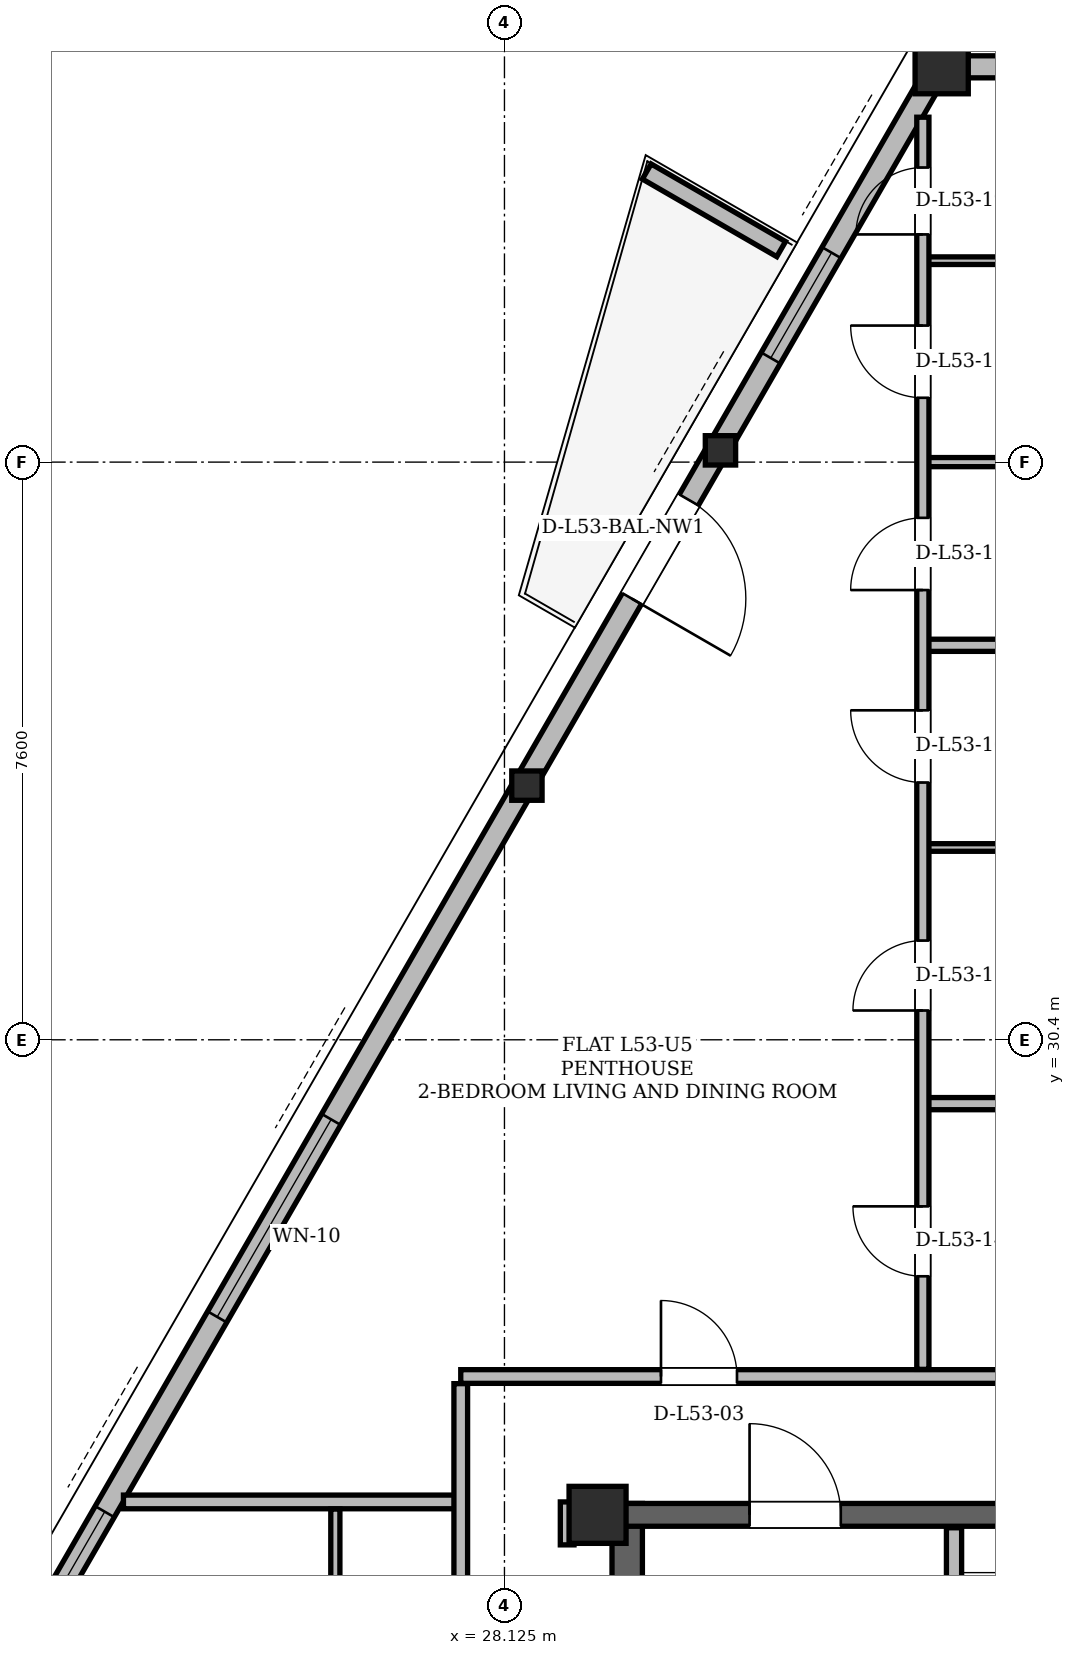
"""IFC4 building model, lengths in metres.
Left out: names, types, materials, properties, quantities, classifications, styles, units other than length and angle.
Written with IfcOpenShell. Run it as: python <this file> out.ifc"""

import sys

from ifc_helpers import new_model, si_unit, direction, frame, frame_2d, origin, origin_2d, place, context, subcontext, project, spatial, polyline, rectangle, hollow_rectangle, i_section, outline, extrude, element, fill, save


model = new_model("IFC4")
c1 = context("Model", 3, precision=1e-05, world=origin(), true_north=direction((0.0, 1.0)))
c2 = subcontext(c1, "Body", "Model", "MODEL_VIEW")
j1 = project(units=[si_unit("LENGTHUNIT", "METRE"), si_unit("PLANEANGLEUNIT", "RADIAN")], contexts=[c1])
p1 = place(None, origin())
s1 = spatial("IfcSite", under=j1, at=p1, CompositionType="ELEMENT")
p2 = place(p1, origin())
s2 = spatial("IfcBuilding", under=s1, at=p2, CompositionType="ELEMENT")
p3 = place(p2, frame((0.0, 0.0, 201.0)))
s3 = spatial("IfcBuildingStorey", under=s2, at=p3, CompositionType="ELEMENT", Elevation=201.0)
p4 = place(p3, frame((29.35, 24.15, 0.0), z_axis=(0.0, 0.0, 1.0), x_axis=(1.0, 0.0, 0.0)))
e1 = element("IfcColumn", 1, at=p4, inside=s3, PredefinedType="COLUMN", context=c2, shape_type="SweptSolid", body=[
    extrude(hollow_rectangle(XDim=0.75, YDim=0.75, WallThickness=0.06, at=origin_2d()), origin(), (0.0, 0.0, 1.0), 3.6),
])
p5 = place(p3, frame((33.841, 43.2, 0.004), z_axis=(0.020527252643, -0.002582899339, 0.999785957358), x_axis=(0.124843395554, 0.9921764594, 0.0)))
e2 = element("IfcColumn", 2, at=p5, inside=s3, PredefinedType="COLUMN", context=c2, shape_type="SweptSolid", body=[
    extrude(hollow_rectangle(XDim=0.7, YDim=0.7, WallThickness=0.055, at=origin_2d()), origin(), (0.0, 0.0, 1.0), 3.592),
])
for number, where, z_axis, x_axis in (
    (3, (30.933, 38.163, 0.004), (0.019, -0.005, 1.0), (0.243, 0.97, 0.0)),
    (4, (28.388, 33.756, 0.004), (0.018, -0.007, 1.0), (0.351, 0.936, 0.0)),
):
    element("IfcColumn", number, at=place(p3, frame(where, z_axis=z_axis, x_axis=x_axis)), inside=s3, PredefinedType="COLUMN", context=c2, shape_type="SweptSolid", body=[
        extrude(i_section(OverallWidth=0.399, OverallDepth=0.386, WebThickness=0.021, FlangeThickness=0.033, at=origin_2d()), origin(), (0.0, 0.0, 1.0), 3.592),
    ])
p6 = place(p3, frame((29.74, 11.0, 0.0), z_axis=(0.0, 0.0, 1.0), x_axis=(0.0, 1.0, 0.0)))
e5 = element("IfcWall", 5, at=p6, inside=s3, PredefinedType="SHEAR", context=c2, shape_type="SweptSolid", body=[
    extrude(rectangle(XDim=13.3, YDim=0.4, at=frame_2d((6.65, 0.0))), origin(), (0.0, 0.0, 1.0), 3.38),
])
p7 = place(p3, frame((29.65, 24.15, 0.0), z_axis=(0.0, 0.0, 1.0), x_axis=(1.0, 0.0, 0.0)))
e6 = element("IfcWall", 6, at=p7, inside=s3, PredefinedType="SHEAR", context=c2, shape_type="SweptSolid", body=[
    extrude(rectangle(XDim=15.7, YDim=0.3, at=frame_2d((7.85, 0.0))), origin(), (0.0, 0.0, 1.0), 3.38),
])
p8 = place(p7, frame((1.7, 0.0, 0.0)))
e7 = element("IfcOpeningElement", 7, at=p8, cuts=e6, PredefinedType="OPENING", context=c2, shape_type="SweptSolid", body=[
    extrude(rectangle(XDim=1.2, YDim=2.2, at=frame_2d((0.6, 1.1))), frame((0.0, 0.15, 0.0), z_axis=(0.0, -1.0, 0.0), x_axis=(1.0, 0.0, 0.0)), (0.0, 0.0, 1.0), 0.3),
])
p9 = place(p7, frame((12.8, 0.0, 0.0)))
e8 = element("IfcOpeningElement", 8, at=p9, cuts=e6, PredefinedType="OPENING", context=c2, shape_type="SweptSolid", body=[
    extrude(rectangle(XDim=1.2, YDim=2.2, at=frame_2d((0.6, 1.1))), frame((0.0, 0.15, 0.0), z_axis=(0.0, -1.0, 0.0), x_axis=(1.0, 0.0, 0.0)), (0.0, 0.0, 1.0), 0.3),
])
p10 = place(p7, frame((6.55, 0.0, 0.0)))
e9 = element("IfcOpeningElement", 9, at=p10, cuts=e6, PredefinedType="OPENING", context=c2, shape_type="SweptSolid", body=[
    extrude(rectangle(XDim=0.9, YDim=2.05, at=frame_2d((0.45, 1.025))), frame((0.0, 0.15, 0.0), z_axis=(0.0, -1.0, 0.0), x_axis=(1.0, 0.0, 0.0)), (0.0, 0.0, 1.0), 0.3),
])
p11 = place(p7, frame((8.45, 0.0, 0.0)))
e10 = element("IfcOpeningElement", 10, at=p11, cuts=e6, PredefinedType="OPENING", context=c2, shape_type="SweptSolid", body=[
    extrude(rectangle(XDim=0.9, YDim=2.05, at=frame_2d((0.45, 1.025))), frame((0.0, 0.15, 0.0), z_axis=(0.0, -1.0, 0.0), x_axis=(1.0, 0.0, 0.0)), (0.0, 0.0, 1.0), 0.3),
])
p12 = place(p3, frame((41.159, 43.2, 0.0), z_axis=(0.0, 0.0, 1.0), x_axis=(-1.0, 0.0, 0.0)))
e11 = element("IfcWall", 11, at=p12, inside=s3, PredefinedType="SOLIDWALL", context=c2, shape_type="SweptSolid", body=[
    extrude(rectangle(XDim=7.318, YDim=0.29, at=frame_2d((3.659, 0.0))), origin(), (0.0, 0.0, 1.0), 2.677),
])
p13 = place(p3, frame((33.841, 43.2, 0.0), z_axis=(0.0, 0.0, 1.0), x_axis=(-0.500001310321, -0.866024647269, 0.0)))
e12 = element("IfcWall", 12, at=p13, inside=s3, PredefinedType="SOLIDWALL", context=c2, shape_type="SweptSolid", body=[
    extrude(rectangle(XDim=36.352, YDim=0.29, at=frame_2d((18.176, 0.0))), origin(), (0.0, 0.0, 1.0), 2.677),
])
p14 = place(p13, frame((6.579, 0.0, 0.0)))
e13 = element("IfcOpeningElement", 13, at=p14, cuts=e12, PredefinedType="OPENING", context=c2, shape_type="SweptSolid", body=[
    extrude(rectangle(XDim=1.5, YDim=2.2, at=frame_2d((0.75, 1.1))), frame((0.0, 0.145, 0.0), z_axis=(0.0, -1.0, 0.0), x_axis=(1.0, 0.0, 0.0)), (0.0, 0.0, 1.0), 0.29),
])
p15 = place(p13, frame((26.818, 0.0, 0.0)))
e14 = element("IfcOpeningElement", 14, at=p15, cuts=e12, PredefinedType="OPENING", context=c2, shape_type="SweptSolid", body=[
    extrude(rectangle(XDim=1.5, YDim=2.2, at=frame_2d((0.75, 1.1))), frame((0.0, 0.145, 0.0), z_axis=(0.0, -1.0, 0.0), x_axis=(1.0, 0.0, 0.0)), (0.0, 0.0, 1.0), 0.29),
])
p16 = place(p13, frame((32.924, 0.0, 0.85)))
e15 = element("IfcOpeningElement", 15, at=p16, cuts=e12, PredefinedType="OPENING", context=c2, shape_type="SweptSolid", body=[
    extrude(rectangle(XDim=1.2, YDim=1.48, at=frame_2d((0.6, 0.74))), frame((0.0, 0.145, 0.0), z_axis=(0.0, -1.0, 0.0), x_axis=(1.0, 0.0, 0.0)), (0.0, 0.0, 1.0), 0.29),
])
p17 = place(p13, frame((21.949, 0.0, 0.85)))
e16 = element("IfcOpeningElement", 16, at=p17, cuts=e12, PredefinedType="OPENING", context=c2, shape_type="SweptSolid", body=[
    extrude(rectangle(XDim=2.0, YDim=1.717, at=frame_2d((1.0, 0.858))), frame((0.0, 0.145, 0.0), z_axis=(0.0, -1.0, 0.0), x_axis=(1.0, 0.0, 0.0)), (0.0, 0.0, 1.0), 0.29),
])
p18 = place(p13, frame((2.823, 0.0, 0.85)))
e17 = element("IfcOpeningElement", 17, at=p18, cuts=e12, PredefinedType="OPENING", context=c2, shape_type="SweptSolid", body=[
    extrude(rectangle(XDim=1.6, YDim=1.7, at=frame_2d((0.8, 0.85))), frame((0.0, 0.145, 0.0), z_axis=(0.0, -1.0, 0.0), x_axis=(1.0, 0.0, 0.0)), (0.0, 0.0, 1.0), 0.29),
])
p19 = place(p13, frame((15.99, 0.0, 0.85)))
e18 = element("IfcOpeningElement", 18, at=p19, cuts=e12, PredefinedType="OPENING", context=c2, shape_type="SweptSolid", body=[
    extrude(rectangle(XDim=3.0, YDim=1.717, at=frame_2d((1.5, 0.858))), frame((0.0, 0.145, 0.0), z_axis=(0.0, -1.0, 0.0), x_axis=(1.0, 0.0, 0.0)), (0.0, 0.0, 1.0), 0.29),
])
p20 = place(p3, frame((31.766, 40.802, 0.0), z_axis=(0.0, 0.0, 1.0), x_axis=(-0.866012356593, 0.500022597718, 0.0)))
e19 = element("IfcWall", 19, at=p20, inside=s3, PredefinedType="PARAPET", context=c2, shape_type="SweptSolid", body=[
    extrude(outline(polyline([(0.0, 0.0), (2.042, 0.0), (2.042, 1.1), (0.0, 1.32), (0.0, 0.0)])), frame((0.0, 0.115, 0.0), z_axis=(0.0, -1.0, 0.0), x_axis=(1.0, 0.0, 0.0)), (0.0, 0.0, 1.0), 0.23),
])
p21 = place(p3, frame((34.04, 19.48, 0.0), z_axis=(0.0, 0.0, 1.0), x_axis=(0.0, 1.0, 0.0)))
e20 = element("IfcWall", 20, at=p21, inside=s3, PredefinedType="PARTITIONING", context=c2, shape_type="SweptSolid", body=[
    extrude(rectangle(XDim=4.5, YDim=0.2, at=frame_2d((2.25, 0.0))), origin(), (0.0, 0.0, 1.0), 3.38),
])
p22 = place(p21, frame((2.12, 0.0, 0.0)))
e21 = element("IfcOpeningElement", 21, at=p22, cuts=e20, PredefinedType="OPENING", context=c2, shape_type="SweptSolid", body=[
    extrude(rectangle(XDim=1.1, YDim=2.2, at=frame_2d((0.55, 1.1))), frame((0.0, 0.1, 0.0), z_axis=(0.0, -1.0, 0.0), x_axis=(1.0, 0.0, 0.0)), (0.0, 0.0, 1.0), 0.2),
])
p23 = place(p3, frame((23.112, 24.32, 0.0), z_axis=(0.0, 0.0, 1.0), x_axis=(1.0, 0.0, 0.0)))
e22 = element("IfcWall", 22, at=p23, inside=s3, PredefinedType="PARTITIONING", context=c2, shape_type="SweptSolid", body=[
    extrude(rectangle(XDim=4.498, YDim=0.18, at=frame_2d((2.249, 0.0))), origin(), (0.0, 0.0, 1.0), 3.38),
])
p24 = place(p3, frame((27.55, 25.97, 0.0), z_axis=(0.0, 0.0, 1.0), x_axis=(1.0, 0.0, 0.0)))
e23 = element("IfcWall", 23, at=p24, inside=s3, PredefinedType="PARTITIONING", context=c2, shape_type="SweptSolid", body=[
    extrude(rectangle(XDim=9.15, YDim=0.18, at=frame_2d((4.575, 0.0))), origin(), (0.0, 0.0, 1.0), 2.913),
])
p25 = place(p24, frame((2.635, 0.0, 0.0)))
e24 = element("IfcOpeningElement", 24, at=p25, cuts=e23, PredefinedType="OPENING", context=c2, shape_type="SweptSolid", body=[
    extrude(rectangle(XDim=1.0, YDim=2.18, at=frame_2d((0.5, 1.09))), frame((0.0, 0.09, 0.0), z_axis=(0.0, -1.0, 0.0), x_axis=(1.0, 0.0, 0.0)), (0.0, 0.0, 1.0), 0.18),
])
p26 = place(p3, frame((33.63, 29.56, 0.0), z_axis=(0.0, 0.0, 1.0), x_axis=(1.0, 0.0, 0.0)))
e25 = element("IfcWall", 25, at=p26, inside=s3, PredefinedType="PARTITIONING", context=c2, shape_type="SweptSolid", body=[
    extrude(rectangle(XDim=3.12, YDim=0.16, at=frame_2d((1.56, 0.0))), origin(), (0.0, 0.0, 1.0), 3.38),
])
p27 = place(p3, frame((33.63, 32.93, 0.0), z_axis=(0.0, 0.0, 1.0), x_axis=(1.0, 0.0, 0.0)))
e26 = element("IfcWall", 26, at=p27, inside=s3, PredefinedType="PARTITIONING", context=c2, shape_type="SweptSolid", body=[
    extrude(rectangle(XDim=3.12, YDim=0.1, at=frame_2d((1.56, 0.0))), origin(), (0.0, 0.0, 1.0), 3.38),
])
p28 = place(p3, frame((33.63, 35.59, 0.0), z_axis=(0.0, 0.0, 1.0), x_axis=(1.0, 0.0, 0.0)))
e27 = element("IfcWall", 27, at=p28, inside=s3, PredefinedType="PARTITIONING", context=c2, shape_type="SweptSolid", body=[
    extrude(rectangle(XDim=3.12, YDim=0.16, at=frame_2d((1.56, 0.0))), origin(), (0.0, 0.0, 1.0), 3.38),
])
p29 = place(p3, frame((33.63, 38.0, 0.0), z_axis=(0.0, 0.0, 1.0), x_axis=(1.0, 0.0, 0.0)))
e28 = element("IfcWall", 28, at=p29, inside=s3, PredefinedType="PARTITIONING", context=c2, shape_type="SweptSolid", body=[
    extrude(rectangle(XDim=3.12, YDim=0.12, at=frame_2d((1.56, 0.0))), origin(), (0.0, 0.0, 1.0), 3.38),
])
p30 = place(p3, frame((33.63, 40.65, 0.0), z_axis=(0.0, 0.0, 1.0), x_axis=(1.0, 0.0, 0.0)))
e29 = element("IfcWall", 29, at=p30, inside=s3, PredefinedType="PARTITIONING", context=c2, shape_type="SweptSolid", body=[
    extrude(rectangle(XDim=3.12, YDim=0.1, at=frame_2d((1.56, 0.0))), origin(), (0.0, 0.0, 1.0), 3.38),
])
p31 = place(p3, frame((25.9, 18.544, 0.0), z_axis=(0.0, 0.0, 1.0), x_axis=(0.0, 1.0, 0.0)))
e30 = element("IfcWall", 30, at=p31, inside=s3, PredefinedType="PARTITIONING", context=c2, shape_type="SweptSolid", body=[
    extrude(rectangle(XDim=5.682, YDim=0.12, at=frame_2d((2.841, 0.0))), origin(), (0.0, 0.0, 1.0), 3.38),
])
p32 = place(p31, frame((2.401, 0.0, 0.0)))
e31 = element("IfcOpeningElement", 31, at=p32, cuts=e30, PredefinedType="OPENING", context=c2, shape_type="SweptSolid", body=[
    extrude(rectangle(XDim=0.88, YDim=2.08, at=frame_2d((0.44, 1.04))), frame((0.0, 0.06, 0.0), z_axis=(0.0, -1.0, 0.0), x_axis=(1.0, 0.0, 0.0)), (0.0, 0.0, 1.0), 0.12),
])
p33 = place(p3, frame((27.55, 18.544, 0.0), z_axis=(0.0, 0.0, 1.0), x_axis=(0.0, 1.0, 0.0)))
e32 = element("IfcWall", 32, at=p33, inside=s3, PredefinedType="PARTITIONING", context=c2, shape_type="SweptSolid", body=[
    extrude(rectangle(XDim=7.332, YDim=0.18, at=frame_2d((3.666, 0.0))), origin(), (0.0, 0.0, 1.0), 3.38),
])
p34 = place(p3, frame((28.95, 23.755, 0.0), z_axis=(0.0, 0.0, 1.0), x_axis=(0.0, 1.0, 0.0)))
e33 = element("IfcWall", 33, at=p34, inside=s3, PredefinedType="PARTITIONING", context=c2, shape_type="SweptSolid", body=[
    extrude(rectangle(XDim=0.565, YDim=0.18, at=frame_2d((0.283, 0.0))), origin(), (0.0, 0.0, 1.0), 3.38),
])
p35 = place(p3, frame((33.63, 26.064, 0.0), z_axis=(0.0, 0.0, 1.0), x_axis=(0.0, 1.0, 0.0)))
e34 = element("IfcWall", 34, at=p35, inside=s3, PredefinedType="PARTITIONING", context=c2, shape_type="SweptSolid", body=[
    extrude(rectangle(XDim=16.474, YDim=0.16, at=frame_2d((8.237, 0.0))), origin(), (0.0, 0.0, 1.0), 2.913),
])
p36 = place(p35, frame((1.225, 0.0, 0.0)))
e35 = element("IfcOpeningElement", 35, at=p36, cuts=e34, PredefinedType="OPENING", context=c2, shape_type="SweptSolid", body=[
    extrude(rectangle(XDim=0.92, YDim=2.12, at=frame_2d((0.46, 1.06))), frame((0.0, 0.08, 0.0), z_axis=(0.0, -1.0, 0.0), x_axis=(1.0, 0.0, 0.0)), (0.0, 0.0, 1.0), 0.16),
])
p37 = place(p35, frame((4.721, 0.0, 0.0)))
e36 = element("IfcOpeningElement", 36, at=p37, cuts=e34, PredefinedType="OPENING", context=c2, shape_type="SweptSolid", body=[
    extrude(rectangle(XDim=0.92, YDim=2.12, at=frame_2d((0.46, 1.06))), frame((0.0, 0.08, 0.0), z_axis=(0.0, -1.0, 0.0), x_axis=(1.0, 0.0, 0.0)), (0.0, 0.0, 1.0), 0.16),
])
p38 = place(p35, frame((7.721, 0.0, 0.0)))
e37 = element("IfcOpeningElement", 37, at=p38, cuts=e34, PredefinedType="OPENING", context=c2, shape_type="SweptSolid", body=[
    extrude(rectangle(XDim=0.95, YDim=2.1, at=frame_2d((0.475, 1.05))), frame((0.0, 0.08, 0.0), z_axis=(0.0, -1.0, 0.0), x_axis=(1.0, 0.0, 0.0)), (0.0, 0.0, 1.0), 0.16),
])
p39 = place(p35, frame((10.253, 0.0, 0.0)))
e38 = element("IfcOpeningElement", 38, at=p39, cuts=e34, PredefinedType="OPENING", context=c2, shape_type="SweptSolid", body=[
    extrude(rectangle(XDim=0.95, YDim=2.1, at=frame_2d((0.475, 1.05))), frame((0.0, 0.08, 0.0), z_axis=(0.0, -1.0, 0.0), x_axis=(1.0, 0.0, 0.0)), (0.0, 0.0, 1.0), 0.16),
])
p40 = place(p35, frame((12.782, 0.0, 0.0)))
e39 = element("IfcOpeningElement", 39, at=p40, cuts=e34, PredefinedType="OPENING", context=c2, shape_type="SweptSolid", body=[
    extrude(rectangle(XDim=0.95, YDim=2.1, at=frame_2d((0.475, 1.05))), frame((0.0, 0.08, 0.0), z_axis=(0.0, -1.0, 0.0), x_axis=(1.0, 0.0, 0.0)), (0.0, 0.0, 1.0), 0.16),
])
p41 = place(p35, frame((14.931, 0.0, 0.0)))
e40 = element("IfcOpeningElement", 40, at=p41, cuts=e34, PredefinedType="OPENING", context=c2, shape_type="SweptSolid", body=[
    extrude(rectangle(XDim=0.88, YDim=2.08, at=frame_2d((0.44, 1.04))), frame((0.0, 0.08, 0.0), z_axis=(0.0, -1.0, 0.0), x_axis=(1.0, 0.0, 0.0)), (0.0, 0.0, 1.0), 0.16),
])
p42 = place(p14, origin())
e41 = element("IfcDoor", 41, at=p42, inside=s3, OperationType="SINGLE_SWING_RIGHT", PredefinedType="DOOR", context=c2, shape_type="SweptSolid", body=[
    extrude(rectangle(XDim=1.5, YDim=2.2, at=frame_2d((0.75, 1.1))), frame((0.0, 0.025, 0.0), z_axis=(0.0, -1.0, 0.0), x_axis=(1.0, 0.0, 0.0)), (0.0, 0.0, 1.0), 0.05),
])
fill(e13, e41)
p43 = place(p17, origin())
e42 = element("IfcWindow", 42, at=p43, inside=s3, PartitioningType="SINGLE_PANEL", PredefinedType="WINDOW", context=c2, shape_type="SweptSolid", body=[
    extrude(rectangle(XDim=2.0, YDim=1.717, at=frame_2d((1.0, 0.858))), frame((0.0, 0.03, 0.0), z_axis=(0.0, -1.0, 0.0), x_axis=(1.0, 0.0, 0.0)), (0.0, 0.0, 1.0), 0.06),
])
fill(e16, e42)
p44 = place(p18, origin())
e43 = element("IfcWindow", 43, at=p44, inside=s3, PartitioningType="SINGLE_PANEL", PredefinedType="WINDOW", context=c2, shape_type="SweptSolid", body=[
    extrude(rectangle(XDim=1.6, YDim=1.7, at=frame_2d((0.8, 0.85))), frame((0.0, 0.03, 0.0), z_axis=(0.0, -1.0, 0.0), x_axis=(1.0, 0.0, 0.0)), (0.0, 0.0, 1.0), 0.06),
])
fill(e17, e43)
p45 = place(p19, origin())
e44 = element("IfcWindow", 44, at=p45, inside=s3, PartitioningType="SINGLE_PANEL", PredefinedType="WINDOW", context=c2, shape_type="SweptSolid", body=[
    extrude(rectangle(XDim=3.0, YDim=1.717, at=frame_2d((1.5, 0.858))), frame((0.0, 0.03, 0.0), z_axis=(0.0, -1.0, 0.0), x_axis=(1.0, 0.0, 0.0)), (0.0, 0.0, 1.0), 0.06),
])
fill(e18, e44)
p46 = place(p8, origin())
e45 = element("IfcDoor", 45, at=p46, inside=s3, OperationType="SINGLE_SWING_LEFT", PredefinedType="DOOR", context=c2, shape_type="SweptSolid", body=[
    extrude(rectangle(XDim=1.2, YDim=2.2, at=frame_2d((0.6, 1.1))), frame((0.0, 0.025, 0.0), z_axis=(0.0, -1.0, 0.0), x_axis=(1.0, 0.0, 0.0)), (0.0, 0.0, 1.0), 0.05),
])
fill(e7, e45)
p47 = place(p25, origin())
e46 = element("IfcDoor", 46, at=p47, inside=s3, OperationType="SINGLE_SWING_LEFT", PredefinedType="DOOR", context=c2, shape_type="SweptSolid", body=[
    extrude(rectangle(XDim=1.0, YDim=2.18, at=frame_2d((0.5, 1.09))), frame((0.0, 0.025, 0.0), z_axis=(0.0, -1.0, 0.0), x_axis=(1.0, 0.0, 0.0)), (0.0, 0.0, 1.0), 0.05),
])
fill(e24, e46)
p48 = place(p36, origin())
e47 = element("IfcDoor", 47, at=p48, inside=s3, OperationType="SINGLE_SWING_RIGHT", PredefinedType="DOOR", context=c2, shape_type="SweptSolid", body=[
    extrude(rectangle(XDim=0.92, YDim=2.12, at=frame_2d((0.46, 1.06))), frame((0.0, 0.025, 0.0), z_axis=(0.0, -1.0, 0.0), x_axis=(1.0, 0.0, 0.0)), (0.0, 0.0, 1.0), 0.05),
])
fill(e35, e47)
p49 = place(p37, origin())
e48 = element("IfcDoor", 48, at=p49, inside=s3, OperationType="SINGLE_SWING_LEFT", PredefinedType="DOOR", context=c2, shape_type="SweptSolid", body=[
    extrude(rectangle(XDim=0.92, YDim=2.12, at=frame_2d((0.46, 1.06))), frame((0.0, 0.025, 0.0), z_axis=(0.0, -1.0, 0.0), x_axis=(1.0, 0.0, 0.0)), (0.0, 0.0, 1.0), 0.05),
])
fill(e36, e48)
p50 = place(p38, origin())
e49 = element("IfcDoor", 49, at=p50, inside=s3, OperationType="SINGLE_SWING_RIGHT", PredefinedType="DOOR", context=c2, shape_type="SweptSolid", body=[
    extrude(rectangle(XDim=0.95, YDim=2.1, at=frame_2d((0.475, 1.05))), frame((0.0, 0.025, 0.0), z_axis=(0.0, -1.0, 0.0), x_axis=(1.0, 0.0, 0.0)), (0.0, 0.0, 1.0), 0.05),
])
fill(e37, e49)
p51 = place(p39, origin())
e50 = element("IfcDoor", 50, at=p51, inside=s3, OperationType="SINGLE_SWING_LEFT", PredefinedType="DOOR", context=c2, shape_type="SweptSolid", body=[
    extrude(rectangle(XDim=0.95, YDim=2.1, at=frame_2d((0.475, 1.05))), frame((0.0, 0.025, 0.0), z_axis=(0.0, -1.0, 0.0), x_axis=(1.0, 0.0, 0.0)), (0.0, 0.0, 1.0), 0.05),
])
fill(e38, e50)
p52 = place(p40, origin())
e51 = element("IfcDoor", 51, at=p52, inside=s3, OperationType="SINGLE_SWING_RIGHT", PredefinedType="DOOR", context=c2, shape_type="SweptSolid", body=[
    extrude(rectangle(XDim=0.95, YDim=2.1, at=frame_2d((0.475, 1.05))), frame((0.0, 0.025, 0.0), z_axis=(0.0, -1.0, 0.0), x_axis=(1.0, 0.0, 0.0)), (0.0, 0.0, 1.0), 0.05),
])
fill(e39, e51)
p53 = place(p41, origin())
e52 = element("IfcDoor", 52, at=p53, inside=s3, OperationType="SINGLE_SWING_LEFT", PredefinedType="DOOR", context=c2, shape_type="SweptSolid", body=[
    extrude(rectangle(XDim=0.88, YDim=2.08, at=frame_2d((0.44, 1.04))), frame((0.0, 0.025, 0.0), z_axis=(0.0, -1.0, 0.0), x_axis=(1.0, 0.0, 0.0)), (0.0, 0.0, 1.0), 0.05),
])
fill(e40, e52)
save(model, sys.argv[1])
